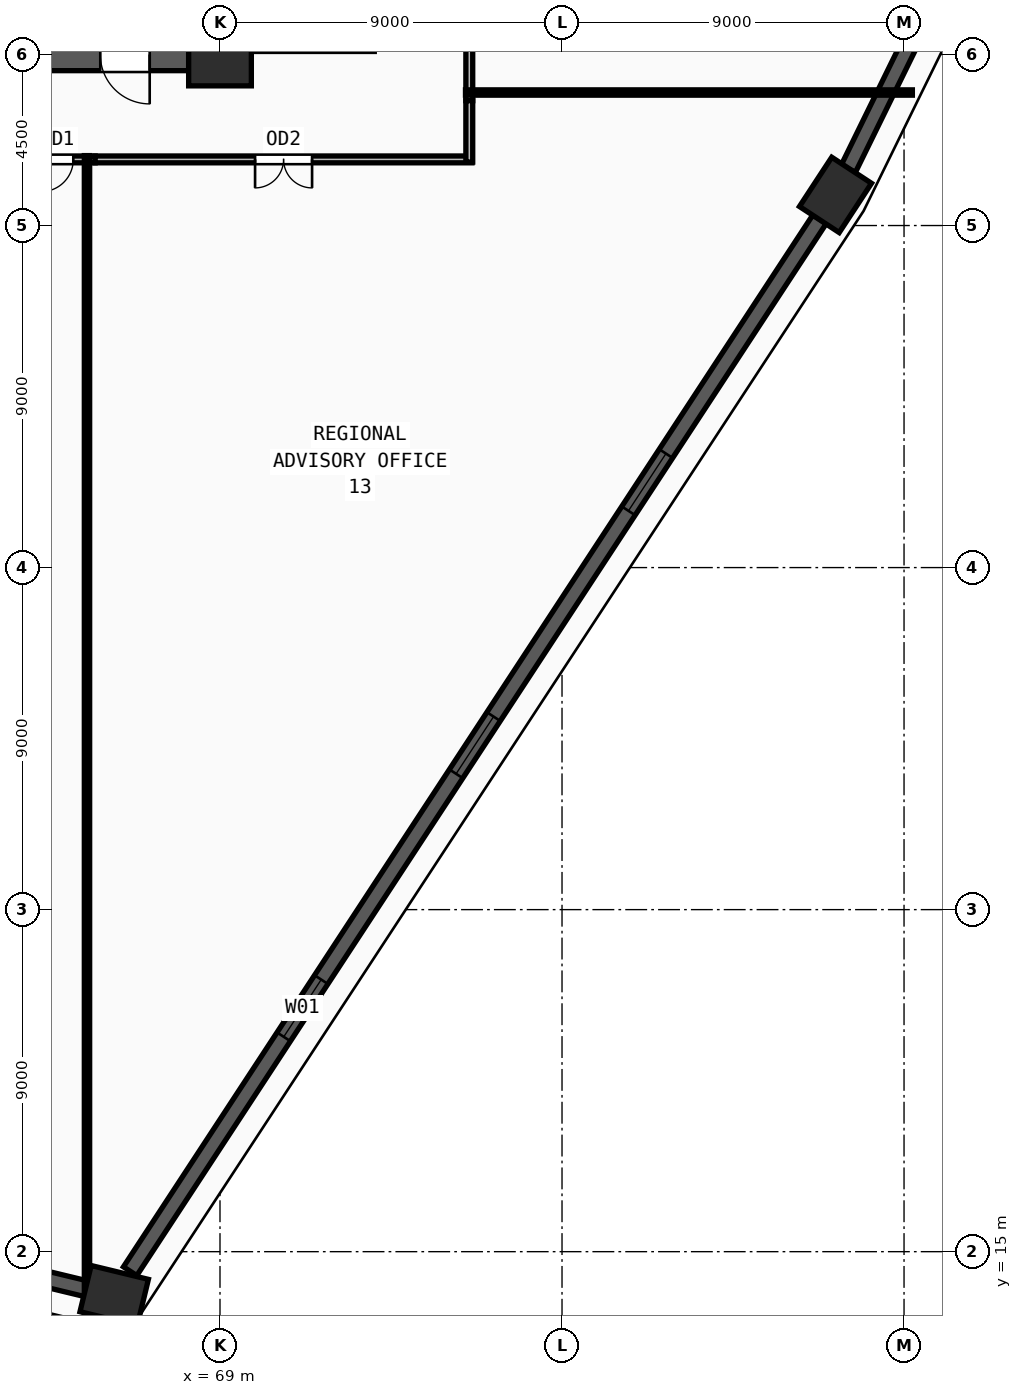
"""IFC4 building model, lengths in metres.
Left out: names, types, materials, properties, quantities, classifications, styles, units other than length and angle.
Written with IfcOpenShell. Run it as: python <this file> out.ifc"""

import sys

from ifc_helpers import new_model, si_unit, direction, frame, frame_2d, origin, origin_2d, place, context, subcontext, project, spatial, rectangle, extrude, source, transform, mapped, element, fill, save


model = new_model("IFC4")
c1 = context("Model", 3, precision=1e-05, world=origin(), true_north=direction((0.0, 1.0)))
c2 = subcontext(c1, "Body", "Model", "MODEL_VIEW")
j1 = project(units=[si_unit("LENGTHUNIT", "METRE"), si_unit("PLANEANGLEUNIT", "RADIAN")], contexts=[c1])
p1 = place(None, origin())
s1 = spatial("IfcSite", under=j1, at=p1, CompositionType="ELEMENT")
p2 = place(p1, origin())
s2 = spatial("IfcBuilding", under=s1, at=p2, CompositionType="ELEMENT")
p3 = place(p2, frame((0.0, 0.0, 74.25)))
s3 = spatial("IfcBuildingStorey", under=s2, at=p3, CompositionType="ELEMENT", Elevation=74.25)
m1 = source(origin(), c2, "Body", "SweptSolid", [
    extrude(rectangle(XDim=1.65, YDim=1.65, at=origin_2d()), origin(), (0.0, 0.0, 1.0), 3.75),
])
p4 = place(p3, frame((69.0, 46.5, 0.0), z_axis=(0.0, 0.0, 1.0), x_axis=(1.0, 0.0, 0.0)))
e1 = element("IfcColumn", 1, at=p4, inside=s3, PredefinedType="COLUMN", context=c2, shape_type="MappedRepresentation", body=[
    mapped(m1, transform((0.0, 0.0, 0.0), x_axis=(1.0, 0.0, 0.0), y_axis=(0.0, 1.0, 0.0), z_axis=(0.0, 0.0, 1.0), scale=1.0)),
])
m2 = source(origin(), c2, "Body", "SweptSolid", [
    extrude(rectangle(XDim=1.55, YDim=1.25, at=origin_2d()), origin(), (0.0, 0.0, 1.0), 3.75),
])
for number, where, z_axis, x_axis in (
    (2, (85.196, 42.806, 0.0), (0.0, 0.0, 1.0), (0.548, 0.836, 0.0)),
    (3, (66.216, 13.846, 0.0), (0.0, 0.0, 1.0), (-0.972, 0.235, 0.0)),
):
    element("IfcColumn", number, at=place(p3, frame(where, z_axis=z_axis, x_axis=x_axis)), inside=s3, PredefinedType="COLUMN", context=c2, shape_type="MappedRepresentation", body=[
        mapped(m2, transform((0.0, 0.0, 0.0), x_axis=(1.0, 0.0, 0.0), y_axis=(0.0, 1.0, 0.0), z_axis=(0.0, 0.0, 1.0), scale=1.0)),
    ])
p5 = place(p3, frame((60.744, 15.167, 0.0), z_axis=(0.0, 0.0, 1.0), x_axis=(0.972088524974, -0.234614363613, 0.0)))
e4 = element("IfcWall", 4, at=p5, inside=s3, PredefinedType="SOLIDWALL", context=c2, shape_type="SweptSolid", body=[
    extrude(rectangle(XDim=4.864, YDim=0.42, at=frame_2d((2.432, 0.0))), origin(), (0.0, 0.0, 1.0), 3.57),
])
m3 = source(origin(), c2, "Body", "SweptSolid", [
    extrude(rectangle(XDim=1.2, YDim=1.9, at=frame_2d((0.6, 0.95))), frame((0.0, 0.22, 0.0), z_axis=(0.0, -1.0, 0.0), x_axis=(1.0, 0.0, 0.0)), (0.0, 0.0, 1.0), 0.44),
])
p6 = place(p5, frame((1.832, 0.0, 0.55)))
e5 = element("IfcOpeningElement", 5, at=p6, cuts=e4, PredefinedType="OPENING", context=c2, shape_type="MappedRepresentation", body=[
    mapped(m3, transform((0.0, 0.0, 0.0), x_axis=(1.0, 0.0, 0.0), y_axis=(0.0, 1.0, 0.0), z_axis=(0.0, 0.0, 1.0), scale=1.0)),
])
p7 = place(p3, frame((66.635, 14.486, 0.0), z_axis=(0.0, 0.0, 1.0), x_axis=(0.548173435932, 0.836364683699, 0.0)))
e6 = element("IfcWall", 6, at=p7, inside=s3, PredefinedType="SOLIDWALL", context=c2, shape_type="SweptSolid", body=[
    extrude(rectangle(XDim=33.095, YDim=0.42, at=frame_2d((16.548, 0.0))), origin(), (0.0, 0.0, 1.0), 3.57),
])
m4 = source(origin(), c2, "Body", "SweptSolid", [
    extrude(rectangle(XDim=1.8, YDim=1.95, at=frame_2d((0.9, 0.975))), frame((0.0, 0.22, 0.0), z_axis=(0.0, -1.0, 0.0), x_axis=(1.0, 0.0, 0.0)), (0.0, 0.0, 1.0), 0.44),
])
p8 = place(p7, frame((7.374, 0.0, 0.55)))
e7 = element("IfcOpeningElement", 7, at=p8, cuts=e6, PredefinedType="OPENING", context=c2, shape_type="MappedRepresentation", body=[
    mapped(m4, transform((0.0, 0.0, 0.0), x_axis=(1.0, 0.0, 0.0), y_axis=(0.0, 1.0, 0.0), z_axis=(0.0, 0.0, 1.0), scale=1.0)),
])
p9 = place(p7, frame((15.648, 0.0, 0.55)))
e8 = element("IfcOpeningElement", 8, at=p9, cuts=e6, PredefinedType="OPENING", context=c2, shape_type="MappedRepresentation", body=[
    mapped(m4, transform((0.0, 0.0, 0.0), x_axis=(1.0, 0.0, 0.0), y_axis=(0.0, 1.0, 0.0), z_axis=(0.0, 0.0, 1.0), scale=1.0)),
])
p10 = place(p7, frame((23.922, 0.0, 0.55)))
e9 = element("IfcOpeningElement", 9, at=p10, cuts=e6, PredefinedType="OPENING", context=c2, shape_type="MappedRepresentation", body=[
    mapped(m4, transform((0.0, 0.0, 0.0), x_axis=(1.0, 0.0, 0.0), y_axis=(0.0, 1.0, 0.0), z_axis=(0.0, 0.0, 1.0), scale=1.0)),
])
p11 = place(p3, frame((85.533, 43.493, 0.0), z_axis=(0.0, 0.0, 1.0), x_axis=(0.440255770672, 0.897872405406, 0.0)))
e10 = element("IfcWall", 10, at=p11, inside=s3, PredefinedType="SOLIDWALL", context=c2, shape_type="SweptSolid", body=[
    extrude(rectangle(XDim=27.296, YDim=0.42, at=frame_2d((13.648, 0.0))), origin(), (0.0, 0.0, 1.0), 3.57),
])
p12 = place(p11, frame((5.074, 0.0, 0.55)))
e11 = element("IfcOpeningElement", 11, at=p12, cuts=e10, PredefinedType="OPENING", context=c2, shape_type="MappedRepresentation", body=[
    mapped(m4, transform((0.0, 0.0, 0.0), x_axis=(1.0, 0.0, 0.0), y_axis=(0.0, 1.0, 0.0), z_axis=(0.0, 0.0, 1.0), scale=1.0)),
])
p13 = place(p11, frame((11.898, 0.0, 0.55)))
e12 = element("IfcOpeningElement", 12, at=p13, cuts=e10, PredefinedType="OPENING", context=c2, shape_type="MappedRepresentation", body=[
    mapped(m4, transform((0.0, 0.0, 0.0), x_axis=(1.0, 0.0, 0.0), y_axis=(0.0, 1.0, 0.0), z_axis=(0.0, 0.0, 1.0), scale=1.0)),
])
p14 = place(p11, frame((19.572, 0.0, 0.55)))
e13 = element("IfcOpeningElement", 13, at=p14, cuts=e10, PredefinedType="OPENING", context=c2, shape_type="MappedRepresentation", body=[
    mapped(m4, transform((0.0, 0.0, 0.0), x_axis=(1.0, 0.0, 0.0), y_axis=(0.0, 1.0, 0.0), z_axis=(0.0, 0.0, 1.0), scale=1.0)),
])
p15 = place(p3, frame((68.175, 46.5, 0.0), z_axis=(0.0, 0.0, 1.0), x_axis=(-1.0, 0.0, 0.0)))
e14 = element("IfcWall", 14, at=p15, inside=s3, PredefinedType="SHEAR", context=c2, shape_type="SweptSolid", body=[
    extrude(rectangle(XDim=7.35, YDim=0.85, at=frame_2d((3.675, 0.0))), origin(), (0.0, 0.0, 1.0), 3.57),
])
m5 = source(origin(), c2, "Body", "SweptSolid", [
    extrude(rectangle(XDim=1.3, YDim=2.2, at=frame_2d((0.65, 1.1))), frame((0.0, 0.435, 0.0), z_axis=(0.0, -1.0, 0.0), x_axis=(1.0, 0.0, 0.0)), (0.0, 0.0, 1.0), 0.87),
])
p16 = place(p15, frame((1.025, 0.0, 0.0)))
e15 = element("IfcOpeningElement", 15, at=p16, cuts=e14, PredefinedType="OPENING", context=c2, shape_type="MappedRepresentation", body=[
    mapped(m5, transform((0.0, 0.0, 0.0), x_axis=(1.0, 0.0, 0.0), y_axis=(0.0, 1.0, 0.0), z_axis=(0.0, 0.0, 1.0), scale=1.0)),
])
p17 = place(p3, frame((65.715, 43.74, 0.0), z_axis=(0.0, 0.0, 1.0), x_axis=(-1.0, 0.0, 0.0)))
e16 = element("IfcWall", 16, at=p17, inside=s3, PredefinedType="PARTITIONING", context=c2, shape_type="SweptSolid", body=[
    extrude(rectangle(XDim=11.0, YDim=0.18, at=frame_2d((5.5, 0.0))), origin(), (0.0, 0.0, 1.0), 3.57),
])
m6 = source(origin(), c2, "Body", "SweptSolid", [
    extrude(rectangle(XDim=0.85, YDim=2.1, at=frame_2d((0.425, 1.05))), frame((0.0, 0.1, 0.0), z_axis=(0.0, -1.0, 0.0), x_axis=(1.0, 0.0, 0.0)), (0.0, 0.0, 1.0), 0.2),
])
p18 = place(p17, frame((0.575, 0.0, 0.0)))
e17 = element("IfcOpeningElement", 17, at=p18, cuts=e16, PredefinedType="OPENING", context=c2, shape_type="MappedRepresentation", body=[
    mapped(m6, transform((0.0, 0.0, 0.0), x_axis=(1.0, 0.0, 0.0), y_axis=(0.0, 1.0, 0.0), z_axis=(0.0, 0.0, 1.0), scale=1.0)),
])
p19 = place(p3, frame((75.63, 43.74, 0.0), z_axis=(0.0, 0.0, 1.0), x_axis=(-1.0, 0.0, 0.0)))
e18 = element("IfcWall", 18, at=p19, inside=s3, PredefinedType="PARTITIONING", context=c2, shape_type="SweptSolid", body=[
    extrude(rectangle(XDim=9.915, YDim=0.18, at=frame_2d((4.958, 0.0))), origin(), (0.0, 0.0, 1.0), 3.57),
])
m7 = source(origin(), c2, "Body", "SweptSolid", [
    extrude(rectangle(XDim=1.5, YDim=2.2, at=frame_2d((0.75, 1.1))), frame((0.0, 0.1, 0.0), z_axis=(0.0, -1.0, 0.0), x_axis=(1.0, 0.0, 0.0)), (0.0, 0.0, 1.0), 0.2),
])
p20 = place(p19, frame((4.207, 0.0, 0.0)))
e19 = element("IfcOpeningElement", 19, at=p20, cuts=e18, PredefinedType="OPENING", context=c2, shape_type="MappedRepresentation", body=[
    mapped(m7, transform((0.0, 0.0, 0.0), x_axis=(1.0, 0.0, 0.0), y_axis=(0.0, 1.0, 0.0), z_axis=(0.0, 0.0, 1.0), scale=1.0)),
])
p21 = place(p3, frame((75.56, 50.785, 0.0), z_axis=(0.0, 0.0, 1.0), x_axis=(0.0, -1.0, 0.0)))
e20 = element("IfcWall", 20, at=p21, inside=s3, PredefinedType="PARTITIONING", context=c2, shape_type="SweptSolid", body=[
    extrude(rectangle(XDim=5.5, YDim=0.18, at=frame_2d((2.75, 0.0))), origin(), (0.0, 0.0, 1.0), 3.57),
])
m8 = source(origin(), c2, "Body", "SweptSolid", [
    extrude(rectangle(XDim=1.0, YDim=2.2, at=frame_2d((0.5, 1.1))), frame((0.0, 0.1, 0.0), z_axis=(0.0, -1.0, 0.0), x_axis=(1.0, 0.0, 0.0)), (0.0, 0.0, 1.0), 0.2),
])
p22 = place(p21, frame((2.25, 0.0, 0.0)))
e21 = element("IfcOpeningElement", 21, at=p22, cuts=e20, PredefinedType="OPENING", context=c2, shape_type="MappedRepresentation", body=[
    mapped(m8, transform((0.0, 0.0, 0.0), x_axis=(1.0, 0.0, 0.0), y_axis=(0.0, 1.0, 0.0), z_axis=(0.0, 0.0, 1.0), scale=1.0)),
])
p23 = place(p3, frame((75.56, 45.285, 0.0), z_axis=(0.0, 0.0, 1.0), x_axis=(0.0, -1.0, 0.0)))
e22 = element("IfcWall", 22, at=p23, inside=s3, PredefinedType="PARTITIONING", context=c2, shape_type="SweptSolid", body=[
    extrude(rectangle(XDim=1.615, YDim=0.18, at=frame_2d((0.808, 0.0))), origin(), (0.0, 0.0, 1.0), 3.57),
])
p24 = place(p3, frame((75.46, 45.5, 0.0), z_axis=(0.0, 0.0, 1.0), x_axis=(1.0, 0.0, 0.0)))
e23 = element("IfcWall", 23, at=p24, inside=s3, PredefinedType="PARTITIONING", context=c2, shape_type="SweptSolid", body=[
    extrude(rectangle(XDim=11.759, YDim=0.14, at=frame_2d((5.879, 0.0))), origin(), (0.0, 0.0, 1.0), 3.57),
])
p25 = place(p3, frame((65.5, 43.84, 0.0), z_axis=(0.0, 0.0, 1.0), x_axis=(0.0, -1.0, 0.0)))
e24 = element("IfcWall", 24, at=p25, inside=s3, PredefinedType="PARTITIONING", context=c2, shape_type="SweptSolid", body=[
    extrude(rectangle(XDim=30.469, YDim=0.14, at=frame_2d((15.234, 0.0))), origin(), (0.0, 0.0, 1.0), 3.57),
])
m9 = source(origin(), c2, "Body", "SweptSolid", [
    extrude(rectangle(XDim=1.8, YDim=1.95, at=frame_2d((0.9, 0.975))), frame((0.0, 0.03, 0.0), z_axis=(0.0, -1.0, 0.0), x_axis=(1.0, 0.0, 0.0)), (0.0, 0.0, 1.0), 0.06),
])
p26 = place(p8, origin())
e25 = element("IfcWindow", 25, at=p26, inside=s3, PartitioningType="DOUBLE_PANEL_VERTICAL", PredefinedType="WINDOW", context=c2, shape_type="MappedRepresentation", body=[
    mapped(m9, transform((0.0, 0.0, 0.0), x_axis=(1.0, 0.0, 0.0), y_axis=(0.0, 1.0, 0.0), z_axis=(0.0, 0.0, 1.0), scale=1.0)),
])
fill(e7, e25)
p27 = place(p9, origin())
e26 = element("IfcWindow", 26, at=p27, inside=s3, PartitioningType="DOUBLE_PANEL_VERTICAL", PredefinedType="WINDOW", context=c2, shape_type="MappedRepresentation", body=[
    mapped(m9, transform((0.0, 0.0, 0.0), x_axis=(1.0, 0.0, 0.0), y_axis=(0.0, 1.0, 0.0), z_axis=(0.0, 0.0, 1.0), scale=1.0)),
])
fill(e8, e26)
p28 = place(p10, origin())
e27 = element("IfcWindow", 27, at=p28, inside=s3, PartitioningType="DOUBLE_PANEL_VERTICAL", PredefinedType="WINDOW", context=c2, shape_type="MappedRepresentation", body=[
    mapped(m9, transform((0.0, 0.0, 0.0), x_axis=(1.0, 0.0, 0.0), y_axis=(0.0, 1.0, 0.0), z_axis=(0.0, 0.0, 1.0), scale=1.0)),
])
fill(e9, e27)
m10 = source(origin(), c2, "Body", "SweptSolid", [
    extrude(rectangle(XDim=1.3, YDim=2.2, at=frame_2d((0.65, 1.1))), frame((0.0, 0.025, 0.0), z_axis=(0.0, -1.0, 0.0), x_axis=(1.0, 0.0, 0.0)), (0.0, 0.0, 1.0), 0.05),
])
p29 = place(p16, origin())
e28 = element("IfcDoor", 28, at=p29, inside=s3, OperationType="SINGLE_SWING_LEFT", PredefinedType="DOOR", context=c2, shape_type="MappedRepresentation", body=[
    mapped(m10, transform((0.0, 0.0, 0.0), x_axis=(1.0, 0.0, 0.0), y_axis=(0.0, 1.0, 0.0), z_axis=(0.0, 0.0, 1.0), scale=1.0)),
])
fill(e15, e28)
m11 = source(origin(), c2, "Body", "SweptSolid", [
    extrude(rectangle(XDim=0.85, YDim=2.1, at=frame_2d((0.425, 1.05))), frame((0.0, 0.025, 0.0), z_axis=(0.0, -1.0, 0.0), x_axis=(1.0, 0.0, 0.0)), (0.0, 0.0, 1.0), 0.05),
])
p30 = place(p18, origin())
e29 = element("IfcDoor", 29, at=p30, inside=s3, OperationType="SINGLE_SWING_RIGHT", PredefinedType="DOOR", context=c2, shape_type="MappedRepresentation", body=[
    mapped(m11, transform((0.0, 0.0, 0.0), x_axis=(1.0, 0.0, 0.0), y_axis=(0.0, 1.0, 0.0), z_axis=(0.0, 0.0, 1.0), scale=1.0)),
])
fill(e17, e29)
m12 = source(origin(), c2, "Body", "SweptSolid", [
    extrude(rectangle(XDim=1.5, YDim=2.2, at=frame_2d((0.75, 1.1))), frame((0.0, 0.025, 0.0), z_axis=(0.0, -1.0, 0.0), x_axis=(1.0, 0.0, 0.0)), (0.0, 0.0, 1.0), 0.05),
])
p31 = place(p20, origin())
e30 = element("IfcDoor", 30, at=p31, inside=s3, OperationType="DOUBLE_DOOR_SINGLE_SWING", PredefinedType="DOOR", context=c2, shape_type="MappedRepresentation", body=[
    mapped(m12, transform((0.0, 0.0, 0.0), x_axis=(1.0, 0.0, 0.0), y_axis=(0.0, 1.0, 0.0), z_axis=(0.0, 0.0, 1.0), scale=1.0)),
])
fill(e19, e30)
save(model, sys.argv[1])
